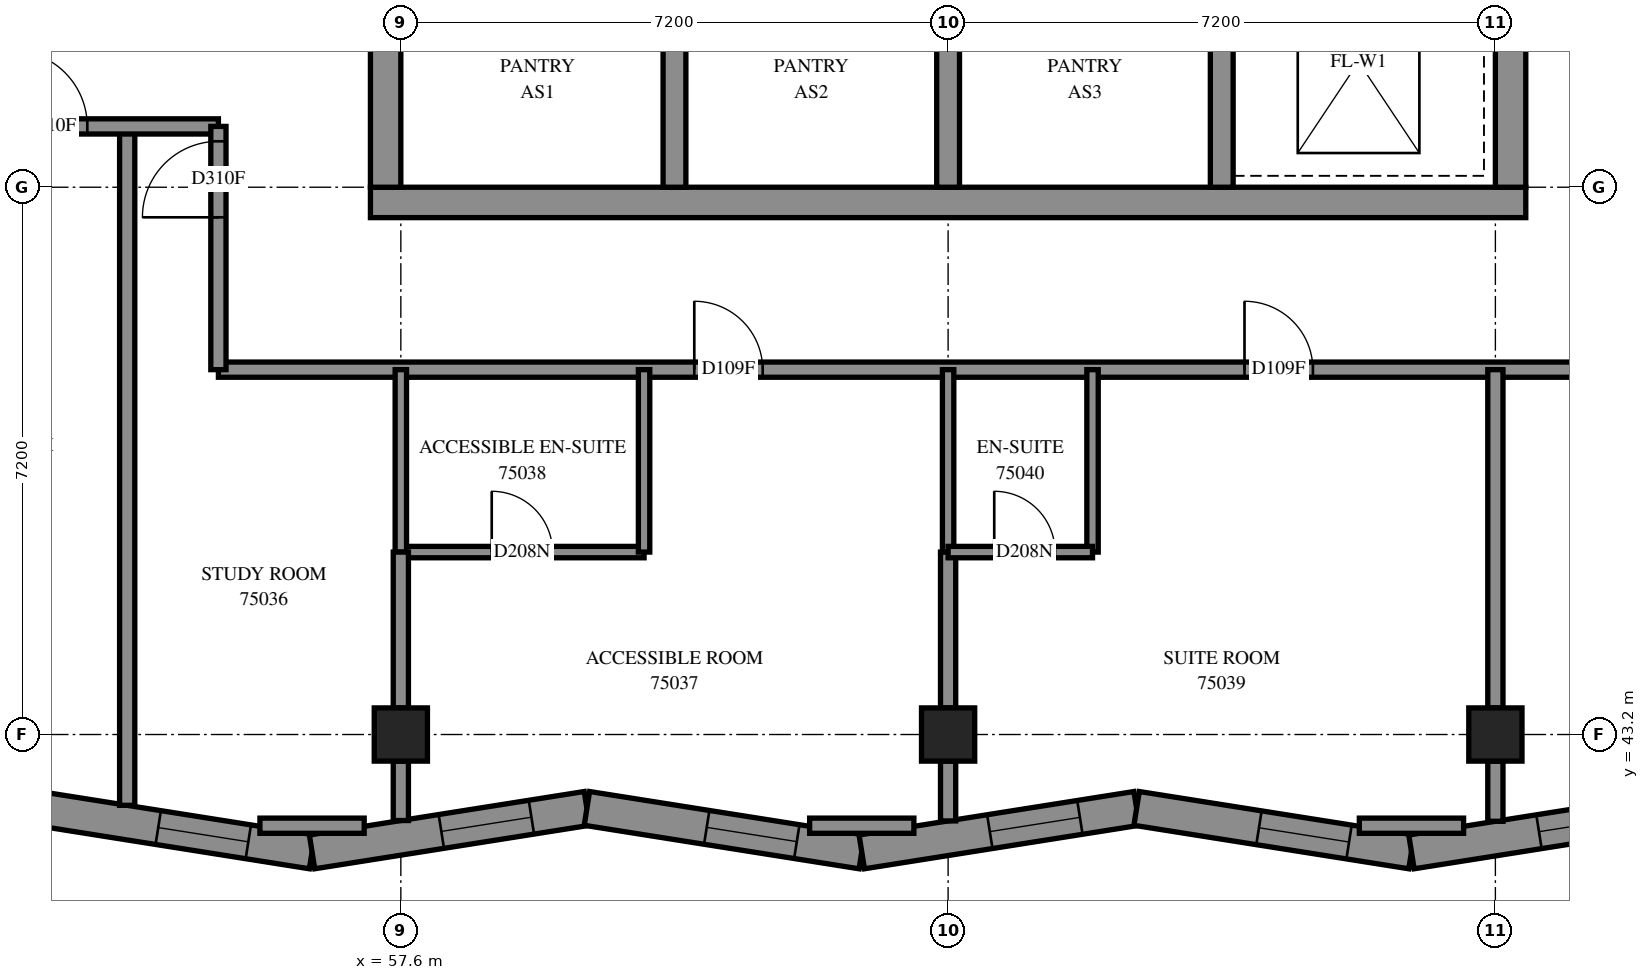
"""IFC4 building model, lengths in metres.
Left out: names, types, materials, properties, quantities, classifications, styles, units other than length and angle.
Written with IfcOpenShell. Run it as: python <this file> out.ifc"""

import sys

from ifc_helpers import new_model, si_unit, direction, frame, frame_2d, origin, origin_2d, place, context, subcontext, project, spatial, polyline, rectangle, outline, extrude, element, fill, save


model = new_model("IFC4")
c1 = context("Model", 3, precision=1e-05, world=origin(), true_north=direction((0.0, 1.0)))
c2 = subcontext(c1, "Body", "Model", "MODEL_VIEW")
j1 = project(units=[si_unit("LENGTHUNIT", "METRE"), si_unit("PLANEANGLEUNIT", "RADIAN")], contexts=[c1])
p1 = place(None, origin())
s1 = spatial("IfcSite", under=j1, at=p1, CompositionType="ELEMENT")
p2 = place(p1, origin())
s2 = spatial("IfcBuilding", under=s1, at=p2, CompositionType="ELEMENT")
p3 = place(p2, frame((0.0, 0.0, 274.4)))
s3 = spatial("IfcBuildingStorey", under=s2, at=p3, CompositionType="ELEMENT", Elevation=274.4)
for number, where, z_axis, x_axis in (
    (1, (57.6, 43.2, 0.0), (0.0, 0.0, 1.0), (1.0, 0.0, 0.0)),
    (2, (64.8, 43.2, 0.0), (0.0, 0.0, 1.0), (1.0, 0.0, 0.0)),
    (3, (72.0, 43.2, 0.0), (0.0, 0.0, 1.0), (1.0, 0.0, 0.0)),
):
    element("IfcColumn", number, at=place(p3, frame(where, z_axis=z_axis, x_axis=x_axis)), inside=s3, PredefinedType="COLUMN", context=c2, shape_type="SweptSolid", body=[
        extrude(rectangle(XDim=0.7, YDim=0.7, at=origin_2d()), origin(), (0.0, 0.0, 1.0), 3.1),
    ])
p4 = place(p3, frame((57.2, 50.2, -0.3), z_axis=(0.0, 0.0, 1.0), x_axis=(1.0, 0.0, 0.0)))
e4 = element("IfcWall", 4, at=p4, inside=s3, PredefinedType="SHEAR", context=c2, shape_type="SweptSolid", body=[
    extrude(rectangle(XDim=15.2, YDim=0.4, at=frame_2d((7.6, 0.0))), origin(), (0.0, 0.0, 1.0), 2.7),
])
p5 = place(p3, frame((57.4, 50.4, -0.3), z_axis=(0.0, 0.0, 1.0), x_axis=(0.0, 1.0, 0.0)))
e5 = element("IfcWall", 5, at=p5, inside=s3, PredefinedType="SHEAR", context=c2, shape_type="SweptSolid", body=[
    extrude(rectangle(XDim=14.4, YDim=0.4, at=frame_2d((7.2, 0.0))), origin(), (0.0, 0.0, 1.0), 2.7),
])
p6 = place(p5, frame((4.55, 0.0, 0.3)))
e6 = element("IfcOpeningElement", 6, at=p6, cuts=e5, PredefinedType="OPENING", context=c2, shape_type="SweptSolid", body=[
    extrude(rectangle(XDim=1.1, YDim=2.1, at=frame_2d((0.55, 1.05))), frame((0.0, 0.21, 0.0), z_axis=(0.0, -1.0, 0.0), x_axis=(1.0, 0.0, 0.0)), (0.0, 0.0, 1.0), 0.42),
])
p7 = place(p5, frame((11.35, 0.0, 0.3)))
e7 = element("IfcOpeningElement", 7, at=p7, cuts=e5, PredefinedType="OPENING", context=c2, shape_type="SweptSolid", body=[
    extrude(rectangle(XDim=1.1, YDim=2.1, at=frame_2d((0.55, 1.05))), frame((0.0, 0.21, 0.0), z_axis=(0.0, -1.0, 0.0), x_axis=(1.0, 0.0, 0.0)), (0.0, 0.0, 1.0), 0.42),
])
p8 = place(p3, frame((72.2, 50.4, -0.3), z_axis=(0.0, 0.0, 1.0), x_axis=(0.0, 1.0, 0.0)))
e8 = element("IfcWall", 8, at=p8, inside=s3, PredefinedType="SHEAR", context=c2, shape_type="SweptSolid", body=[
    extrude(rectangle(XDim=14.4, YDim=0.4, at=frame_2d((7.2, 0.0))), origin(), (0.0, 0.0, 1.0), 2.7),
])
p9 = place(p8, frame((4.55, 0.0, 0.3)))
e9 = element("IfcOpeningElement", 9, at=p9, cuts=e8, PredefinedType="OPENING", context=c2, shape_type="SweptSolid", body=[
    extrude(rectangle(XDim=1.1, YDim=2.1, at=frame_2d((0.55, 1.05))), frame((0.0, 0.21, 0.0), z_axis=(0.0, -1.0, 0.0), x_axis=(1.0, 0.0, 0.0)), (0.0, 0.0, 1.0), 0.42),
])
p10 = place(p8, frame((11.35, 0.0, 0.3)))
e10 = element("IfcOpeningElement", 10, at=p10, cuts=e8, PredefinedType="OPENING", context=c2, shape_type="SweptSolid", body=[
    extrude(rectangle(XDim=1.1, YDim=2.1, at=frame_2d((0.55, 1.05))), frame((0.0, 0.21, 0.0), z_axis=(0.0, -1.0, 0.0), x_axis=(1.0, 0.0, 0.0)), (0.0, 0.0, 1.0), 0.42),
])
for number, where, z_axis, x_axis in (
    (11, (61.2, 50.4, 0.0), (0.0, 0.0, 1.0), (0.0, 1.0, 0.0)),
    (12, (64.8, 50.4, 0.0), (0.0, 0.0, 1.0), (0.0, 1.0, 0.0)),
    (13, (68.4, 50.4, 0.0), (0.0, 0.0, 1.0), (0.0, 1.0, 0.0)),
):
    element("IfcWall", number, at=place(p3, frame(where, z_axis=z_axis, x_axis=x_axis)), inside=s3, PredefinedType="SOLIDWALL", context=c2, shape_type="SweptSolid", body=[
        extrude(rectangle(XDim=3.3, YDim=0.3, at=frame_2d((1.65, 0.0))), origin(), (0.0, 0.0, 1.0), 3.1),
    ])
p11 = place(p3, frame((52.798, 42.231, 0.0), z_axis=(0.0, 0.0, 1.0), x_axis=(0.9877170854, -0.1562528693, 0.0)))
e14 = element("IfcWall", 14, at=p11, inside=s3, PredefinedType="SOLIDWALL", context=c2, shape_type="SweptSolid", body=[
    extrude(outline(polyline([(0.054, -0.225), (3.715, -0.225), (3.644, 0.225), (-0.054, 0.225), (0.054, -0.225)])), origin(), (0.0, 0.0, 1.0), 3.1),
])
p12 = place(p11, frame((1.63, 0.0, 0.45)))
e15 = element("IfcOpeningElement", 15, at=p12, cuts=e14, PredefinedType="OPENING", context=c2, shape_type="SweptSolid", body=[
    extrude(rectangle(XDim=1.2, YDim=2.55, at=frame_2d((0.6, 1.275))), frame((0.0, 0.235, 0.0), z_axis=(0.0, -1.0, 0.0), x_axis=(1.0, 0.0, 0.0)), (0.0, 0.0, 1.0), 0.47),
])
p13 = place(p3, frame((56.432, 41.656, 0.0), z_axis=(0.0, 0.0, 1.0), x_axis=(0.9877186305, 0.156243102, 0.0)))
e16 = element("IfcWall", 16, at=p13, inside=s3, PredefinedType="SOLIDWALL", context=c2, shape_type="SweptSolid", body=[
    extrude(outline(polyline([(-0.036, -0.225), (3.625, -0.225), (3.696, 0.225), (0.036, 0.225), (-0.036, -0.225)])), origin(), (0.0, 0.0, 1.0), 3.1),
])
p14 = place(p13, frame((1.722, 0.0, 0.45)))
e17 = element("IfcOpeningElement", 17, at=p14, cuts=e16, PredefinedType="OPENING", context=c2, shape_type="SweptSolid", body=[
    extrude(rectangle(XDim=1.2, YDim=2.55, at=frame_2d((0.6, 1.275))), frame((0.0, 0.235, 0.0), z_axis=(0.0, -1.0, 0.0), x_axis=(1.0, 0.0, 0.0)), (0.0, 0.0, 1.0), 0.47),
])
p15 = place(p3, frame((60.048, 42.228, 0.0), z_axis=(0.0, 0.0, 1.0), x_axis=(0.9877179637, -0.1562473175, 0.0)))
e18 = element("IfcWall", 18, at=p15, inside=s3, PredefinedType="SOLIDWALL", context=c2, shape_type="SweptSolid", body=[
    extrude(outline(polyline([(0.036, -0.225), (3.696, -0.225), (3.625, 0.225), (-0.036, 0.225), (0.036, -0.225)])), origin(), (0.0, 0.0, 1.0), 3.1),
])
p16 = place(p15, frame((1.596, 0.0, 0.45)))
e19 = element("IfcOpeningElement", 19, at=p16, cuts=e18, PredefinedType="OPENING", context=c2, shape_type="SweptSolid", body=[
    extrude(rectangle(XDim=1.2, YDim=2.55, at=frame_2d((0.6, 1.275))), frame((0.0, 0.235, 0.0), z_axis=(0.0, -1.0, 0.0), x_axis=(1.0, 0.0, 0.0)), (0.0, 0.0, 1.0), 0.47),
])
p17 = place(p3, frame((63.664, 41.656, 0.0), z_axis=(0.0, 0.0, 1.0), x_axis=(0.9877186305, 0.156243102, 0.0)))
e20 = element("IfcWall", 20, at=p17, inside=s3, PredefinedType="SOLIDWALL", context=c2, shape_type="SweptSolid", body=[
    extrude(outline(polyline([(-0.036, -0.225), (3.625, -0.225), (3.696, 0.225), (0.036, 0.225), (-0.036, -0.225)])), origin(), (0.0, 0.0, 1.0), 3.1),
])
p18 = place(p17, frame((1.706, 0.0, 0.45)))
e21 = element("IfcOpeningElement", 21, at=p18, cuts=e20, PredefinedType="OPENING", context=c2, shape_type="SweptSolid", body=[
    extrude(rectangle(XDim=1.2, YDim=2.55, at=frame_2d((0.6, 1.275))), frame((0.0, 0.235, 0.0), z_axis=(0.0, -1.0, 0.0), x_axis=(1.0, 0.0, 0.0)), (0.0, 0.0, 1.0), 0.47),
])
p19 = place(p3, frame((67.28, 42.228, 0.0), z_axis=(0.0, 0.0, 1.0), x_axis=(0.9877186305, -0.156243102, 0.0)))
e22 = element("IfcWall", 22, at=p19, inside=s3, PredefinedType="SOLIDWALL", context=c2, shape_type="SweptSolid", body=[
    extrude(outline(polyline([(0.036, -0.225), (3.696, -0.225), (3.625, 0.225), (-0.036, 0.225), (0.036, -0.225)])), origin(), (0.0, 0.0, 1.0), 3.1),
])
p20 = place(p19, frame((1.63, 0.0, 0.45)))
e23 = element("IfcOpeningElement", 23, at=p20, cuts=e22, PredefinedType="OPENING", context=c2, shape_type="SweptSolid", body=[
    extrude(rectangle(XDim=1.2, YDim=2.55, at=frame_2d((0.6, 1.275))), frame((0.0, 0.235, 0.0), z_axis=(0.0, -1.0, 0.0), x_axis=(1.0, 0.0, 0.0)), (0.0, 0.0, 1.0), 0.47),
])
p21 = place(p3, frame((70.896, 41.656, 0.0), z_axis=(0.0, 0.0, 1.0), x_axis=(0.9877170854, 0.1562528693, 0.0)))
e24 = element("IfcWall", 24, at=p21, inside=s3, PredefinedType="SOLIDWALL", context=c2, shape_type="SweptSolid", body=[
    extrude(outline(polyline([(-0.036, -0.225), (3.625, -0.225), (3.733, 0.225), (0.036, 0.225), (-0.036, -0.225)])), origin(), (0.0, 0.0, 1.0), 3.1),
])
p22 = place(p21, frame((1.698, 0.0, 0.45)))
e25 = element("IfcOpeningElement", 25, at=p22, cuts=e24, PredefinedType="OPENING", context=c2, shape_type="SweptSolid", body=[
    extrude(rectangle(XDim=1.2, YDim=2.55, at=frame_2d((0.6, 1.275))), frame((0.0, 0.235, 0.0), z_axis=(0.0, -1.0, 0.0), x_axis=(1.0, 0.0, 0.0)), (0.0, 0.0, 1.0), 0.47),
])
p23 = place(p3, frame((55.2, 48.0, 0.0), z_axis=(0.0, 0.0, 1.0), x_axis=(1.0, 0.0, 0.0)))
e26 = element("IfcWall", 26, at=p23, inside=s3, PredefinedType="PARTITIONING", context=c2, shape_type="SweptSolid", body=[
    extrude(rectangle(XDim=19.15, YDim=0.2, at=frame_2d((9.575, 0.0))), origin(), (0.0, 0.0, 1.0), 3.1),
])
p24 = place(p23, frame((6.261, 0.0, 0.0)))
e27 = element("IfcOpeningElement", 27, at=p24, cuts=e26, PredefinedType="OPENING", context=c2, shape_type="SweptSolid", body=[
    extrude(rectangle(XDim=0.9, YDim=2.1, at=frame_2d((0.45, 1.05))), frame((0.0, 0.11, 0.0), z_axis=(0.0, -1.0, 0.0), x_axis=(1.0, 0.0, 0.0)), (0.0, 0.0, 1.0), 0.22),
])
p25 = place(p23, frame((13.499, 0.0, 0.0)))
e28 = element("IfcOpeningElement", 28, at=p25, cuts=e26, PredefinedType="OPENING", context=c2, shape_type="SweptSolid", body=[
    extrude(rectangle(XDim=0.9, YDim=2.1, at=frame_2d((0.45, 1.05))), frame((0.0, 0.11, 0.0), z_axis=(0.0, -1.0, 0.0), x_axis=(1.0, 0.0, 0.0)), (0.0, 0.0, 1.0), 0.22),
])
p26 = place(p3, frame((54.0, 42.268, 0.0), z_axis=(0.0, 0.0, 1.0), x_axis=(0.0, 1.0, 0.0)))
e29 = element("IfcWall", 29, at=p26, inside=s3, PredefinedType="PARTITIONING", context=c2, shape_type="SweptSolid", body=[
    extrude(rectangle(XDim=8.932, YDim=0.2, at=frame_2d((4.466, 0.0))), origin(), (0.0, 0.0, 1.0), 3.1),
])
p27 = place(p3, frame((50.4, 51.2, 0.0), z_axis=(0.0, 0.0, 1.0), x_axis=(1.0, 0.0, 0.0)))
e30 = element("IfcWall", 30, at=p27, inside=s3, PredefinedType="PARTITIONING", context=c2, shape_type="SweptSolid", body=[
    extrude(rectangle(XDim=4.8, YDim=0.2, at=frame_2d((2.4, 0.0))), origin(), (0.0, 0.0, 1.0), 3.1),
])
p28 = place(p27, frame((2.075, 0.0, 0.0)))
e31 = element("IfcOpeningElement", 31, at=p28, cuts=e30, PredefinedType="OPENING", context=c2, shape_type="SweptSolid", body=[
    extrude(rectangle(XDim=1.0, YDim=2.1, at=frame_2d((0.5, 1.05))), frame((0.0, 0.11, 0.0), z_axis=(0.0, -1.0, 0.0), x_axis=(1.0, 0.0, 0.0)), (0.0, 0.0, 1.0), 0.22),
])
p29 = place(p3, frame((72.0, 43.55, 0.0), z_axis=(0.0, 0.0, 1.0), x_axis=(0.0, 1.0, 0.0)))
e32 = element("IfcWall", 32, at=p29, inside=s3, PredefinedType="PARTITIONING", context=c2, shape_type="SweptSolid", body=[
    extrude(rectangle(XDim=4.45, YDim=0.2, at=frame_2d((2.225, 0.0))), origin(), (0.0, 0.0, 1.0), 3.1),
])
p30 = place(p3, frame((55.2, 48.0, 0.0), z_axis=(0.0, 0.0, 1.0), x_axis=(0.0, 1.0, 0.0)))
e33 = element("IfcWall", 33, at=p30, inside=s3, PredefinedType="PARTITIONING", context=c2, shape_type="SweptSolid", body=[
    extrude(rectangle(XDim=3.2, YDim=0.2, at=frame_2d((1.6, 0.0))), origin(), (0.0, 0.0, 1.0), 3.1),
])
p31 = place(p30, frame((2.004, 0.0, 0.0)))
e34 = element("IfcOpeningElement", 34, at=p31, cuts=e33, PredefinedType="OPENING", context=c2, shape_type="SweptSolid", body=[
    extrude(rectangle(XDim=1.0, YDim=2.1, at=frame_2d((0.5, 1.05))), frame((0.0, 0.11, 0.0), z_axis=(0.0, -1.0, 0.0), x_axis=(1.0, 0.0, 0.0)), (0.0, 0.0, 1.0), 0.22),
])
p32 = place(p3, frame((57.6, 45.6, 0.0), z_axis=(0.0, 0.0, 1.0), x_axis=(1.0, 0.0, 0.0)))
e35 = element("IfcWall", 35, at=p32, inside=s3, PredefinedType="PARTITIONING", context=c2, shape_type="SweptSolid", body=[
    extrude(rectangle(XDim=3.2, YDim=0.15, at=frame_2d((1.6, 0.0))), origin(), (0.0, 0.0, 1.0), 3.1),
])
p33 = place(p32, frame((1.196, 0.0, 0.0)))
e36 = element("IfcOpeningElement", 36, at=p33, cuts=e35, PredefinedType="OPENING", context=c2, shape_type="SweptSolid", body=[
    extrude(rectangle(XDim=0.8, YDim=2.1, at=frame_2d((0.4, 1.05))), frame((0.0, 0.085, 0.0), z_axis=(0.0, -1.0, 0.0), x_axis=(1.0, 0.0, 0.0)), (0.0, 0.0, 1.0), 0.17),
])
for number, where, z_axis, x_axis in (
    (37, (60.8, 45.6, 0.0), (0.0, 0.0, 1.0), (0.0, 1.0, 0.0)),
    (38, (57.6, 45.6, 0.0), (0.0, 0.0, 1.0), (0.0, 1.0, 0.0)),
    (39, (66.7, 45.6, 0.0), (0.0, 0.0, 1.0), (0.0, 1.0, 0.0)),
    (40, (64.8, 45.6, 0.0), (0.0, 0.0, 1.0), (0.0, 1.0, 0.0)),
):
    element("IfcWall", number, at=place(p3, frame(where, z_axis=z_axis, x_axis=x_axis)), inside=s3, PredefinedType="PARTITIONING", context=c2, shape_type="SweptSolid", body=[
        extrude(rectangle(XDim=2.4, YDim=0.15, at=frame_2d((1.2, 0.0))), origin(), (0.0, 0.0, 1.0), 3.1),
    ])
for number, where, z_axis, x_axis in (
    (41, (57.6, 43.55, 0.0), (0.0, 0.0, 1.0), (0.0, 1.0, 0.0)),
    (42, (64.8, 43.55, 0.0), (0.0, 0.0, 1.0), (0.0, 1.0, 0.0)),
):
    element("IfcWall", number, at=place(p3, frame(where, z_axis=z_axis, x_axis=x_axis)), inside=s3, PredefinedType="PARTITIONING", context=c2, shape_type="SweptSolid", body=[
        extrude(rectangle(XDim=2.05, YDim=0.2, at=frame_2d((1.025, 0.0))), origin(), (0.0, 0.0, 1.0), 3.1),
    ])
p34 = place(p3, frame((64.8, 45.6, 0.0), z_axis=(0.0, 0.0, 1.0), x_axis=(1.0, 0.0, 0.0)))
e43 = element("IfcWall", 43, at=p34, inside=s3, PredefinedType="PARTITIONING", context=c2, shape_type="SweptSolid", body=[
    extrude(rectangle(XDim=1.9, YDim=0.15, at=frame_2d((0.95, 0.0))), origin(), (0.0, 0.0, 1.0), 3.1),
])
p35 = place(p34, frame((0.607, 0.0, 0.0)))
e44 = element("IfcOpeningElement", 44, at=p35, cuts=e43, PredefinedType="OPENING", context=c2, shape_type="SweptSolid", body=[
    extrude(rectangle(XDim=0.8, YDim=2.1, at=frame_2d((0.4, 1.05))), frame((0.0, 0.085, 0.0), z_axis=(0.0, -1.0, 0.0), x_axis=(1.0, 0.0, 0.0)), (0.0, 0.0, 1.0), 0.17),
])
for number, where, z_axis, x_axis in (
    (45, (62.978, 42.0, 0.0), (0.0, 0.0, 1.0), (1.0, 0.0, 0.0)),
    (46, (55.746, 42.0, 0.0), (0.0, 0.0, 1.0), (1.0, 0.0, 0.0)),
    (47, (70.21, 42.0, 0.0), (0.0, 0.0, 1.0), (1.0, 0.0, 0.0)),
):
    element("IfcWall", number, at=place(p3, frame(where, z_axis=z_axis, x_axis=x_axis)), inside=s3, PredefinedType="PARTITIONING", context=c2, shape_type="SweptSolid", body=[
        extrude(rectangle(XDim=1.372, YDim=0.2, at=frame_2d((0.686, 0.0))), origin(), (0.0, 0.0, 1.0), 3.1),
    ])
p36 = place(p3, frame((72.0, 42.058, 0.0), z_axis=(0.0, 0.0, 1.0), x_axis=(0.0, 1.0, 0.0)))
e48 = element("IfcWall", 48, at=p36, inside=s3, PredefinedType="PARTITIONING", context=c2, shape_type="SweptSolid", body=[
    extrude(rectangle(XDim=0.792, YDim=0.2, at=frame_2d((0.396, 0.0))), origin(), (0.0, 0.0, 1.0), 3.1),
])
p37 = place(p3, frame((64.8, 42.063, 0.0), z_axis=(0.0, 0.0, 1.0), x_axis=(0.0, 1.0, 0.0)))
e49 = element("IfcWall", 49, at=p37, inside=s3, PredefinedType="PARTITIONING", context=c2, shape_type="SweptSolid", body=[
    extrude(rectangle(XDim=0.787, YDim=0.2, at=frame_2d((0.393, 0.0))), origin(), (0.0, 0.0, 1.0), 3.1),
])
p38 = place(p3, frame((57.6, 42.068, 0.0), z_axis=(0.0, 0.0, 1.0), x_axis=(0.0, 1.0, 0.0)))
e50 = element("IfcWall", 50, at=p38, inside=s3, PredefinedType="PARTITIONING", context=c2, shape_type="SweptSolid", body=[
    extrude(rectangle(XDim=0.782, YDim=0.2, at=frame_2d((0.391, 0.0))), origin(), (0.0, 0.0, 1.0), 3.1),
])
p39 = place(p12, origin())
e51 = element("IfcWindow", 51, at=p39, inside=s3, PartitioningType="SINGLE_PANEL", PredefinedType="WINDOW", context=c2, shape_type="SweptSolid", body=[
    extrude(rectangle(XDim=1.2, YDim=2.55, at=frame_2d((0.6, 1.275))), frame((0.0, 0.205, 0.0), z_axis=(0.0, -1.0, 0.0), x_axis=(1.0, 0.0, 0.0)), (0.0, 0.0, 1.0), 0.06),
])
fill(e15, e51)
p40 = place(p14, origin())
e52 = element("IfcWindow", 52, at=p40, inside=s3, PartitioningType="SINGLE_PANEL", PredefinedType="WINDOW", context=c2, shape_type="SweptSolid", body=[
    extrude(rectangle(XDim=1.2, YDim=2.55, at=frame_2d((0.6, 1.275))), frame((0.0, 0.205, 0.0), z_axis=(0.0, -1.0, 0.0), x_axis=(1.0, 0.0, 0.0)), (0.0, 0.0, 1.0), 0.06),
])
fill(e17, e52)
p41 = place(p16, origin())
e53 = element("IfcWindow", 53, at=p41, inside=s3, PartitioningType="SINGLE_PANEL", PredefinedType="WINDOW", context=c2, shape_type="SweptSolid", body=[
    extrude(rectangle(XDim=1.2, YDim=2.55, at=frame_2d((0.6, 1.275))), frame((0.0, 0.205, 0.0), z_axis=(0.0, -1.0, 0.0), x_axis=(1.0, 0.0, 0.0)), (0.0, 0.0, 1.0), 0.06),
])
fill(e19, e53)
p42 = place(p18, origin())
e54 = element("IfcWindow", 54, at=p42, inside=s3, PartitioningType="SINGLE_PANEL", PredefinedType="WINDOW", context=c2, shape_type="SweptSolid", body=[
    extrude(rectangle(XDim=1.2, YDim=2.55, at=frame_2d((0.6, 1.275))), frame((0.0, 0.205, 0.0), z_axis=(0.0, -1.0, 0.0), x_axis=(1.0, 0.0, 0.0)), (0.0, 0.0, 1.0), 0.06),
])
fill(e21, e54)
p43 = place(p20, origin())
e55 = element("IfcWindow", 55, at=p43, inside=s3, PartitioningType="SINGLE_PANEL", PredefinedType="WINDOW", context=c2, shape_type="SweptSolid", body=[
    extrude(rectangle(XDim=1.2, YDim=2.55, at=frame_2d((0.6, 1.275))), frame((0.0, 0.205, 0.0), z_axis=(0.0, -1.0, 0.0), x_axis=(1.0, 0.0, 0.0)), (0.0, 0.0, 1.0), 0.06),
])
fill(e23, e55)
p44 = place(p22, origin())
e56 = element("IfcWindow", 56, at=p44, inside=s3, PartitioningType="SINGLE_PANEL", PredefinedType="WINDOW", context=c2, shape_type="SweptSolid", body=[
    extrude(rectangle(XDim=1.2, YDim=2.55, at=frame_2d((0.6, 1.275))), frame((0.0, 0.205, 0.0), z_axis=(0.0, -1.0, 0.0), x_axis=(1.0, 0.0, 0.0)), (0.0, 0.0, 1.0), 0.06),
])
fill(e25, e56)
p45 = place(p28, origin())
e57 = element("IfcDoor", 57, at=p45, inside=s3, OperationType="SINGLE_SWING_LEFT", PredefinedType="DOOR", context=c2, shape_type="SweptSolid", body=[
    extrude(rectangle(XDim=1.0, YDim=2.1, at=frame_2d((0.5, 1.05))), frame((0.0, 0.025, 0.0), z_axis=(0.0, -1.0, 0.0), x_axis=(1.0, 0.0, 0.0)), (0.0, 0.0, 1.0), 0.05),
])
fill(e31, e57)
p46 = place(p31, origin())
e58 = element("IfcDoor", 58, at=p46, inside=s3, OperationType="SINGLE_SWING_RIGHT", PredefinedType="DOOR", context=c2, shape_type="SweptSolid", body=[
    extrude(rectangle(XDim=1.0, YDim=2.1, at=frame_2d((0.5, 1.05))), frame((0.0, 0.025, 0.0), z_axis=(0.0, -1.0, 0.0), x_axis=(1.0, 0.0, 0.0)), (0.0, 0.0, 1.0), 0.05),
])
fill(e34, e58)
p47 = place(p24, origin())
e59 = element("IfcDoor", 59, at=p47, inside=s3, OperationType="SINGLE_SWING_LEFT", PredefinedType="DOOR", context=c2, shape_type="SweptSolid", body=[
    extrude(rectangle(XDim=0.9, YDim=2.1, at=frame_2d((0.45, 1.05))), frame((0.0, 0.025, 0.0), z_axis=(0.0, -1.0, 0.0), x_axis=(1.0, 0.0, 0.0)), (0.0, 0.0, 1.0), 0.05),
])
fill(e27, e59)
p48 = place(p33, origin())
e60 = element("IfcDoor", 60, at=p48, inside=s3, OperationType="SINGLE_SWING_RIGHT", PredefinedType="DOOR", context=c2, shape_type="SweptSolid", body=[
    extrude(rectangle(XDim=0.8, YDim=2.1, at=frame_2d((0.4, 1.05))), frame((0.0, 0.025, 0.0), z_axis=(0.0, -1.0, 0.0), x_axis=(1.0, 0.0, 0.0)), (0.0, 0.0, 1.0), 0.05),
])
fill(e36, e60)
p49 = place(p25, origin())
e61 = element("IfcDoor", 61, at=p49, inside=s3, OperationType="SINGLE_SWING_LEFT", PredefinedType="DOOR", context=c2, shape_type="SweptSolid", body=[
    extrude(rectangle(XDim=0.9, YDim=2.1, at=frame_2d((0.45, 1.05))), frame((0.0, 0.025, 0.0), z_axis=(0.0, -1.0, 0.0), x_axis=(1.0, 0.0, 0.0)), (0.0, 0.0, 1.0), 0.05),
])
fill(e28, e61)
p50 = place(p35, origin())
e62 = element("IfcDoor", 62, at=p50, inside=s3, OperationType="SINGLE_SWING_RIGHT", PredefinedType="DOOR", context=c2, shape_type="SweptSolid", body=[
    extrude(rectangle(XDim=0.8, YDim=2.1, at=frame_2d((0.4, 1.05))), frame((0.0, 0.025, 0.0), z_axis=(0.0, -1.0, 0.0), x_axis=(1.0, 0.0, 0.0)), (0.0, 0.0, 1.0), 0.05),
])
fill(e44, e62)
save(model, sys.argv[1])
